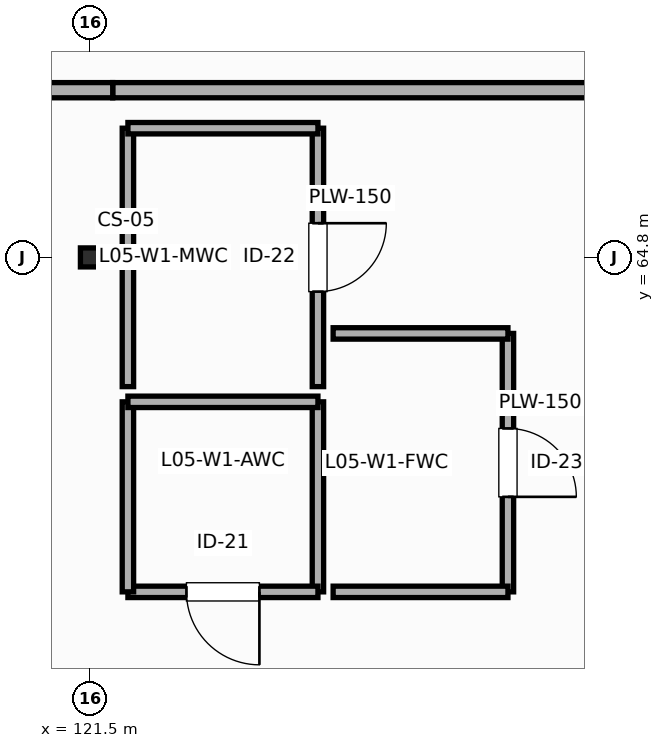
"""IFC4 building model, lengths in metres.
Left out: names, types, materials, properties, quantities, classifications, styles, units other than length and angle.
Written with IfcOpenShell. Run it as: python <this file> out.ifc"""

import sys

from ifc_helpers import new_model, si_unit, direction, frame, frame_2d, origin, origin_2d, place, context, subcontext, project, spatial, rectangle, hollow_rectangle, extrude, element, fill, save


model = new_model("IFC4")
c1 = context("Model", 3, precision=1e-05, world=origin(), true_north=direction((0.0, 1.0)))
c2 = subcontext(c1, "Body", "Model", "MODEL_VIEW")
j1 = project(units=[si_unit("LENGTHUNIT", "METRE"), si_unit("PLANEANGLEUNIT", "RADIAN")], contexts=[c1])
p1 = place(None, origin())
s1 = spatial("IfcSite", under=j1, at=p1, CompositionType="ELEMENT")
p2 = place(p1, origin())
s2 = spatial("IfcBuilding", under=s1, at=p2, CompositionType="ELEMENT")
p3 = place(p2, frame((0.0, 0.0, 23.4)))
s3 = spatial("IfcBuildingStorey", under=s2, at=p3, CompositionType="ELEMENT", Elevation=23.4)
p4 = place(p3, frame((121.5, 64.8, 0.0), z_axis=(0.0, 0.0, 1.0), x_axis=(1.0, 0.0, 0.0)))
e1 = element("IfcColumn", 1, at=p4, inside=s3, PredefinedType="COLUMN", context=c2, shape_type="SweptSolid", body=[
    extrude(hollow_rectangle(XDim=0.25, YDim=0.25, WallThickness=0.012, InnerFilletRadius=0.012, OuterFilletRadius=0.025, at=origin_2d()), origin(), (0.0, 0.0, 1.0), 4.2),
])
p5 = place(p3, frame((124.5, 62.9, 0.0), z_axis=(0.0, 0.0, 1.0), x_axis=(0.0, -1.0, 0.0)))
e2 = element("IfcWall", 2, at=p5, inside=s3, PredefinedType="PLUMBINGWALL", context=c2, shape_type="SweptSolid", body=[
    extrude(rectangle(XDim=2.5, YDim=0.15, at=frame_2d((1.25, 0.0))), origin(), (0.0, 0.0, 1.0), 3.92),
])
p6 = place(p3, frame((124.5, 60.4, 0.0), z_axis=(0.0, 0.0, 1.0), x_axis=(-1.0, 0.0, 0.0)))
e3 = element("IfcWall", 3, at=p6, inside=s3, PredefinedType="PLUMBINGWALL", context=c2, shape_type="SweptSolid", body=[
    extrude(rectangle(XDim=2.5, YDim=0.15, at=frame_2d((1.25, 0.0))), origin(), (0.0, 0.0, 1.0), 3.92),
])
p7 = place(p6, frame((0.77, 0.0, 0.0)))
e4 = element("IfcOpeningElement", 4, at=p7, cuts=e3, PredefinedType="OPENING", context=c2, shape_type="SweptSolid", body=[
    extrude(rectangle(XDim=0.96, YDim=2.16, at=frame_2d((0.48, 1.08))), frame((0.0, 0.085, 0.0), z_axis=(0.0, -1.0, 0.0), x_axis=(1.0, 0.0, 0.0)), (0.0, 0.0, 1.0), 0.17),
])
for number, where, z_axis, x_axis in (
    (5, (122.0, 60.4, 0.0), (0.0, 0.0, 1.0), (0.0, 1.0, 0.0)),
    (6, (122.0, 62.9, 0.0), (0.0, 0.0, 1.0), (1.0, 0.0, 0.0)),
):
    element("IfcWall", number, at=place(p3, frame(where, z_axis=z_axis, x_axis=x_axis)), inside=s3, PredefinedType="PLUMBINGWALL", context=c2, shape_type="SweptSolid", body=[
        extrude(rectangle(XDim=2.5, YDim=0.15, at=frame_2d((1.25, 0.0))), origin(), (0.0, 0.0, 1.0), 3.92),
    ])
p8 = place(p3, frame((127.0, 63.8, 0.0), z_axis=(0.0, 0.0, 1.0), x_axis=(0.0, -1.0, 0.0)))
e7 = element("IfcWall", 7, at=p8, inside=s3, PredefinedType="PLUMBINGWALL", context=c2, shape_type="SweptSolid", body=[
    extrude(rectangle(XDim=3.4, YDim=0.15, at=frame_2d((1.7, 0.0))), origin(), (0.0, 0.0, 1.0), 3.92),
])
p9 = place(p8, frame((1.25, 0.0, 0.0)))
e8 = element("IfcOpeningElement", 8, at=p9, cuts=e7, PredefinedType="OPENING", context=c2, shape_type="SweptSolid", body=[
    extrude(rectangle(XDim=0.9, YDim=2.2, at=frame_2d((0.45, 1.1))), frame((0.0, 0.085, 0.0), z_axis=(0.0, -1.0, 0.0), x_axis=(1.0, 0.0, 0.0)), (0.0, 0.0, 1.0), 0.17),
])
for number, where, z_axis, x_axis in (
    (9, (127.0, 60.4, 0.0), (0.0, 0.0, 1.0), (-1.0, 0.0, 0.0)),
    (10, (124.7, 63.8, 0.0), (0.0, 0.0, 1.0), (1.0, 0.0, 0.0)),
):
    element("IfcWall", number, at=place(p3, frame(where, z_axis=z_axis, x_axis=x_axis)), inside=s3, PredefinedType="PLUMBINGWALL", context=c2, shape_type="SweptSolid", body=[
        extrude(rectangle(XDim=2.3, YDim=0.15, at=frame_2d((1.15, 0.0))), origin(), (0.0, 0.0, 1.0), 3.92),
    ])
p10 = place(p3, frame((124.5, 66.5, 0.0), z_axis=(0.0, 0.0, 1.0), x_axis=(0.0, -1.0, 0.0)))
e11 = element("IfcWall", 11, at=p10, inside=s3, PredefinedType="PLUMBINGWALL", context=c2, shape_type="SweptSolid", body=[
    extrude(rectangle(XDim=3.4, YDim=0.15, at=frame_2d((1.7, 0.0))), origin(), (0.0, 0.0, 1.0), 3.92),
])
p11 = place(p10, frame((1.25, 0.0, 0.0)))
e12 = element("IfcOpeningElement", 12, at=p11, cuts=e11, PredefinedType="OPENING", context=c2, shape_type="SweptSolid", body=[
    extrude(rectangle(XDim=0.9, YDim=2.1, at=frame_2d((0.45, 1.05))), frame((0.0, 0.085, 0.0), z_axis=(0.0, -1.0, 0.0), x_axis=(1.0, 0.0, 0.0)), (0.0, 0.0, 1.0), 0.17),
])
p12 = place(p3, frame((122.0, 63.1, 0.0), z_axis=(0.0, 0.0, 1.0), x_axis=(0.0, 1.0, 0.0)))
e13 = element("IfcWall", 13, at=p12, inside=s3, PredefinedType="PLUMBINGWALL", context=c2, shape_type="SweptSolid", body=[
    extrude(rectangle(XDim=3.4, YDim=0.15, at=frame_2d((1.7, 0.0))), origin(), (0.0, 0.0, 1.0), 3.92),
])
p13 = place(p3, frame((122.0, 66.5, 0.0), z_axis=(0.0, 0.0, 1.0), x_axis=(1.0, 0.0, 0.0)))
e14 = element("IfcWall", 14, at=p13, inside=s3, PredefinedType="PLUMBINGWALL", context=c2, shape_type="SweptSolid", body=[
    extrude(rectangle(XDim=2.5, YDim=0.15, at=frame_2d((1.25, 0.0))), origin(), (0.0, 0.0, 1.0), 3.92),
])
for number, where, z_axis, x_axis in (
    (15, (129.8, 67.0, 0.0), (0.0, 0.0, 1.0), (-1.0, 0.0, 0.0)),
    (16, (121.8, 67.0, 0.0), (0.0, 0.0, 1.0), (-1.0, 0.0, 0.0)),
):
    element("IfcWall", number, at=place(p3, frame(where, z_axis=z_axis, x_axis=x_axis)), inside=s3, PredefinedType="PARTITIONING", context=c2, shape_type="SweptSolid", body=[
        extrude(rectangle(XDim=8.0, YDim=0.2, at=frame_2d((4.0, 0.0))), origin(), (0.0, 0.0, 1.0), 3.92),
    ])
p14 = place(p7, origin())
e17 = element("IfcDoor", 17, at=p14, inside=s3, OperationType="SINGLE_SWING_LEFT", PredefinedType="DOOR", context=c2, shape_type="SweptSolid", body=[
    extrude(rectangle(XDim=0.96, YDim=2.16, at=frame_2d((0.48, 1.08))), frame((0.0, 0.025, 0.0), z_axis=(0.0, -1.0, 0.0), x_axis=(1.0, 0.0, 0.0)), (0.0, 0.0, 1.0), 0.05),
])
fill(e4, e17)
p15 = place(p9, origin())
e18 = element("IfcDoor", 18, at=p15, inside=s3, OperationType="SINGLE_SWING_RIGHT", PredefinedType="DOOR", context=c2, shape_type="SweptSolid", body=[
    extrude(rectangle(XDim=0.9, YDim=2.2, at=frame_2d((0.45, 1.1))), frame((0.0, 0.025, 0.0), z_axis=(0.0, -1.0, 0.0), x_axis=(1.0, 0.0, 0.0)), (0.0, 0.0, 1.0), 0.05),
])
fill(e8, e18)
p16 = place(p11, origin())
e19 = element("IfcDoor", 19, at=p16, inside=s3, OperationType="SINGLE_SWING_LEFT", PredefinedType="DOOR", context=c2, shape_type="SweptSolid", body=[
    extrude(rectangle(XDim=0.9, YDim=2.1, at=frame_2d((0.45, 1.05))), frame((0.0, 0.025, 0.0), z_axis=(0.0, -1.0, 0.0), x_axis=(1.0, 0.0, 0.0)), (0.0, 0.0, 1.0), 0.05),
])
fill(e12, e19)
save(model, sys.argv[1])
